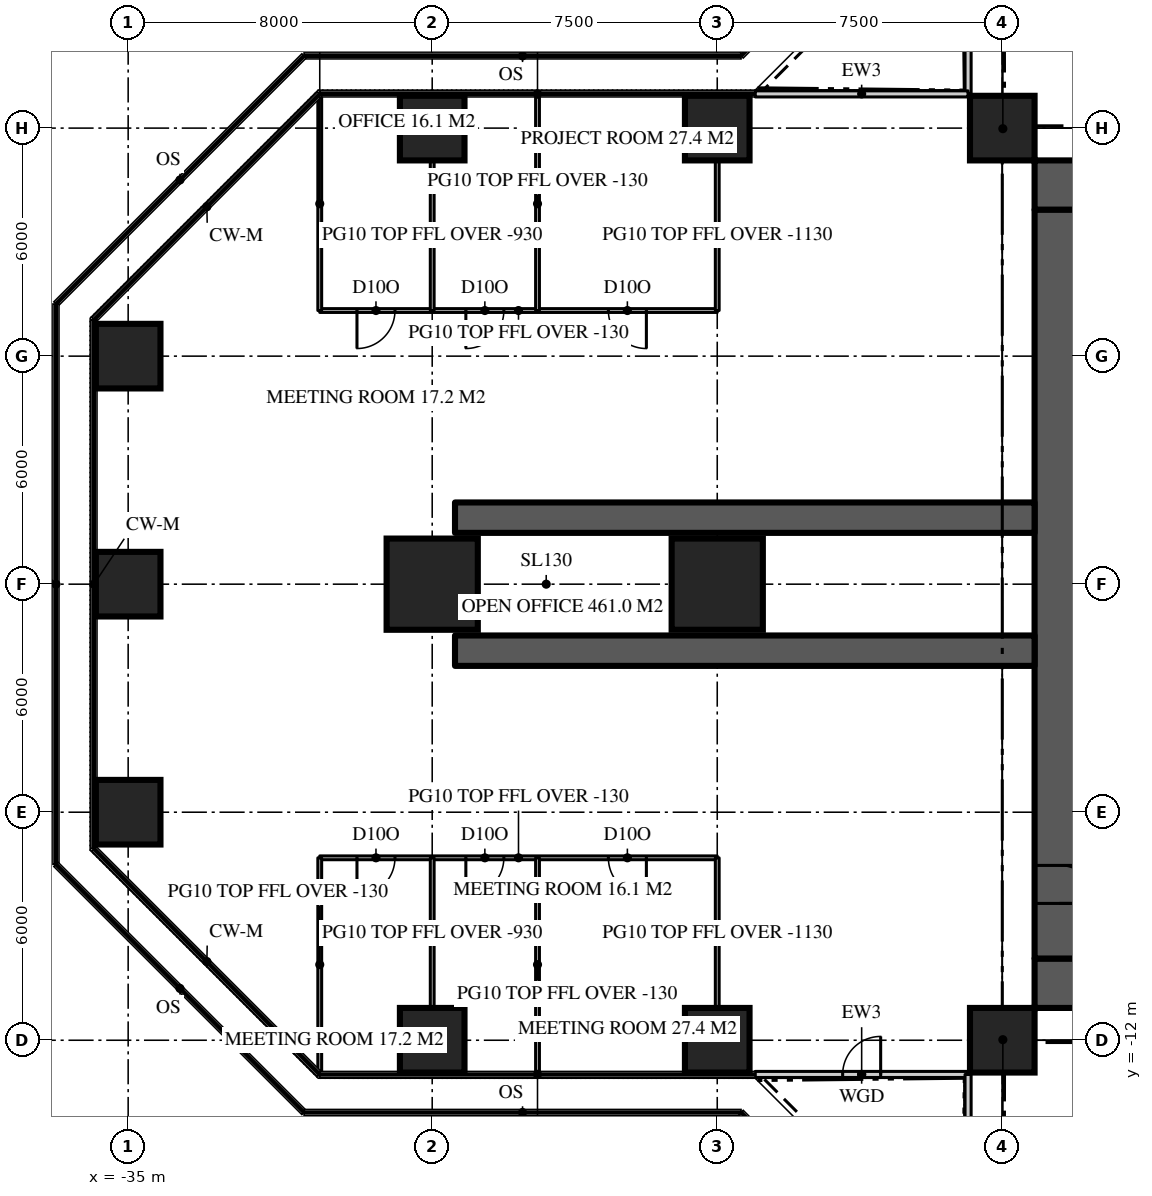
"""IFC4 building model, lengths in metres.
Left out: names, types, materials, properties, quantities, classifications, styles, units other than length and angle.
Written with IfcOpenShell. Run it as: python <this file> out.ifc"""

import sys

from ifc_helpers import new_model, si_unit, direction, frame, frame_2d, origin, origin_2d, place, context, subcontext, project, spatial, rectangle, extrude, element, fill, save


model = new_model("IFC4")
c1 = context("Model", 3, precision=1e-05, world=origin(), true_north=direction((0.0, 1.0)))
c2 = subcontext(c1, "Body", "Model", "MODEL_VIEW")
j1 = project(units=[si_unit("LENGTHUNIT", "METRE"), si_unit("PLANEANGLEUNIT", "RADIAN")], contexts=[c1])
p1 = place(None, origin())
s1 = spatial("IfcSite", under=j1, at=p1, CompositionType="ELEMENT")
p2 = place(p1, origin())
s2 = spatial("IfcBuilding", under=s1, at=p2, CompositionType="ELEMENT")
p3 = place(p2, frame((0.0, 0.0, 171.0)))
s3 = spatial("IfcBuildingStorey", under=s2, at=p3, CompositionType="ELEMENT", Elevation=171.0)
p4 = place(p3, frame((-11.15, 10.5, 0.0), z_axis=(0.0, 0.0, 1.0), x_axis=(1.0, 0.0, 0.0)))
e1 = element("IfcWall", 1, at=p4, inside=s3, PredefinedType="SHEAR", context=c2, shape_type="SweptSolid", body=[
    extrude(rectangle(XDim=22.3, YDim=1.3, at=frame_2d((11.15, 0.0))), origin(), (0.0, 0.0, 1.0), 3.9),
])
p5 = place(p4, frame((4.25, 0.0, 0.0)))
e2 = element("IfcOpeningElement", 2, at=p5, cuts=e1, PredefinedType="OPENING", context=c2, shape_type="SweptSolid", body=[
    extrude(rectangle(XDim=1.8, YDim=2.2, at=frame_2d((0.9, 1.1))), frame((0.0, 0.66, 0.0), z_axis=(0.0, -1.0, 0.0), x_axis=(1.0, 0.0, 0.0)), (0.0, 0.0, 1.0), 1.32),
])
p6 = place(p4, frame((16.25, 0.0, 0.0)))
e3 = element("IfcOpeningElement", 3, at=p6, cuts=e1, PredefinedType="OPENING", context=c2, shape_type="SweptSolid", body=[
    extrude(rectangle(XDim=1.8, YDim=2.2, at=frame_2d((0.9, 1.1))), frame((0.0, 0.66, 0.0), z_axis=(0.0, -1.0, 0.0), x_axis=(1.0, 0.0, 0.0)), (0.0, 0.0, 1.0), 1.32),
])
p7 = place(p3, frame((11.15, -10.5, 0.0), z_axis=(0.0, 0.0, 1.0), x_axis=(-1.0, 0.0, 0.0)))
e4 = element("IfcWall", 4, at=p7, inside=s3, PredefinedType="SHEAR", context=c2, shape_type="SweptSolid", body=[
    extrude(rectangle(XDim=22.3, YDim=1.3, at=frame_2d((11.15, 0.0))), origin(), (0.0, 0.0, 1.0), 3.9),
])
p8 = place(p7, frame((16.25, 0.0, 0.0)))
e5 = element("IfcOpeningElement", 5, at=p8, cuts=e4, PredefinedType="OPENING", context=c2, shape_type="SweptSolid", body=[
    extrude(rectangle(XDim=1.8, YDim=2.2, at=frame_2d((0.9, 1.1))), frame((0.0, 0.66, 0.0), z_axis=(0.0, -1.0, 0.0), x_axis=(1.0, 0.0, 0.0)), (0.0, 0.0, 1.0), 1.32),
])
p9 = place(p7, frame((4.25, 0.0, 0.0)))
e6 = element("IfcOpeningElement", 6, at=p9, cuts=e4, PredefinedType="OPENING", context=c2, shape_type="SweptSolid", body=[
    extrude(rectangle(XDim=1.8, YDim=2.2, at=frame_2d((0.9, 1.1))), frame((0.0, 0.66, 0.0), z_axis=(0.0, -1.0, 0.0), x_axis=(1.0, 0.0, 0.0)), (0.0, 0.0, 1.0), 1.32),
])
p10 = place(p3, frame((-10.5, 9.85, 0.0), z_axis=(0.0, 0.0, 1.0), x_axis=(0.0, -1.0, 0.0)))
e7 = element("IfcWall", 7, at=p10, inside=s3, PredefinedType="SHEAR", context=c2, shape_type="SweptSolid", body=[
    extrude(rectangle(XDim=19.7, YDim=1.3, at=frame_2d((9.85, 0.0))), origin(), (0.0, 0.0, 1.0), 3.9),
])
p11 = place(p10, frame((17.25, 0.0, 0.0)))
e8 = element("IfcOpeningElement", 8, at=p11, cuts=e7, PredefinedType="OPENING", context=c2, shape_type="SweptSolid", body=[
    extrude(rectangle(XDim=1.0, YDim=2.2, at=frame_2d((0.5, 1.1))), frame((0.0, 0.66, 0.0), z_axis=(0.0, -1.0, 0.0), x_axis=(1.0, 0.0, 0.0)), (0.0, 0.0, 1.0), 1.32),
])
for number, where, z_axis, x_axis in (
    (9, (-11.15, 1.75, 0.0), (0.0, 0.0, 1.0), (-1.0, 0.0, 0.0)),
    (10, (-11.15, -1.75, 0.0), (0.0, 0.0, 1.0), (-1.0, 0.0, 0.0)),
):
    element("IfcWall", number, at=place(p3, frame(where, z_axis=z_axis, x_axis=x_axis)), inside=s3, PredefinedType="SHEAR", context=c2, shape_type="SweptSolid", body=[
        extrude(rectangle(XDim=15.25, YDim=0.8, at=frame_2d((7.625, 0.0))), origin(), (0.0, 0.0, 1.0), 3.9),
    ])
for number, where, z_axis, x_axis in (
    (11, (-27.0, -12.0, 0.0), (0.0, 0.0, 1.0), (1.0, 0.0, 0.0)),
    (12, (-19.5, -12.0, 0.0), (0.0, 0.0, 1.0), (1.0, 0.0, 0.0)),
    (13, (-12.0, -12.0, 0.0), (0.0, 0.0, 1.0), (1.0, 0.0, 0.0)),
    (14, (-35.0, -6.0, 0.0), (0.0, 0.0, 1.0), (1.0, 0.0, 0.0)),
    (15, (-35.0, 0.0, 0.0), (0.0, 0.0, 1.0), (1.0, 0.0, 0.0)),
):
    element("IfcColumn", number, at=place(p3, frame(where, z_axis=z_axis, x_axis=x_axis)), inside=s3, PredefinedType="COLUMN", context=c2, shape_type="SweptSolid", body=[
        extrude(rectangle(XDim=1.7, YDim=1.7, at=origin_2d()), origin(), (0.0, 0.0, 1.0), 3.9),
    ])
for number, where, z_axis, x_axis in (
    (16, (-27.0, 0.0, 0.0), (0.0, 0.0, 1.0), (1.0, 0.0, 0.0)),
    (17, (-19.5, 0.0, 0.0), (0.0, 0.0, 1.0), (1.0, 0.0, 0.0)),
):
    element("IfcColumn", number, at=place(p3, frame(where, z_axis=z_axis, x_axis=x_axis)), inside=s3, PredefinedType="COLUMN", context=c2, shape_type="SweptSolid", body=[
        extrude(rectangle(XDim=2.4, YDim=2.4, at=origin_2d()), origin(), (0.0, 0.0, 1.0), 3.9),
    ])
for number, where, z_axis, x_axis in (
    (18, (-35.0, 6.0, 0.0), (0.0, 0.0, 1.0), (1.0, 0.0, 0.0)),
    (19, (-27.0, 12.0, 0.0), (0.0, 0.0, 1.0), (1.0, 0.0, 0.0)),
    (20, (-19.5, 12.0, 0.0), (0.0, 0.0, 1.0), (1.0, 0.0, 0.0)),
    (21, (-12.0, 12.0, 0.0), (0.0, 0.0, 1.0), (1.0, 0.0, 0.0)),
):
    element("IfcColumn", number, at=place(p3, frame(where, z_axis=z_axis, x_axis=x_axis)), inside=s3, PredefinedType="COLUMN", context=c2, shape_type="SweptSolid", body=[
        extrude(rectangle(XDim=1.7, YDim=1.7, at=origin_2d()), origin(), (0.0, 0.0, 1.0), 3.9),
    ])
p12 = place(p3, frame((-12.9, 18.5, 0.0), z_axis=(0.0, 0.0, 1.0), x_axis=(0.0, -1.0, 0.0)))
e22 = element("IfcWall", 22, at=p12, inside=s3, PredefinedType="SOLIDWALL", context=c2, shape_type="SweptSolid", body=[
    extrude(rectangle(XDim=5.6, YDim=0.16, at=frame_2d((2.8, 0.0))), origin(), (0.0, 0.0, 1.0), 3.77),
])
p13 = place(p12, frame((2.3, 0.0, 0.0)))
e23 = element("IfcOpeningElement", 23, at=p13, cuts=e22, PredefinedType="OPENING", context=c2, shape_type="SweptSolid", body=[
    extrude(rectangle(XDim=1.0, YDim=2.2, at=frame_2d((0.5, 1.1))), frame((0.0, 0.09, 0.0), z_axis=(0.0, -1.0, 0.0), x_axis=(1.0, 0.0, 0.0)), (0.0, 0.0, 1.0), 0.18),
])
p14 = place(p3, frame((-12.9, 12.9, 0.0), z_axis=(0.0, 0.0, 1.0), x_axis=(-1.0, 0.0, 0.0)))
e24 = element("IfcWall", 24, at=p14, inside=s3, PredefinedType="SOLIDWALL", context=c2, shape_type="SweptSolid", body=[
    extrude(rectangle(XDim=5.6, YDim=0.16, at=frame_2d((2.8, 0.0))), origin(), (0.0, 0.0, 1.0), 3.77),
])
p15 = place(p3, frame((-18.5, -12.9, 0.0), z_axis=(0.0, 0.0, 1.0), x_axis=(1.0, 0.0, 0.0)))
e25 = element("IfcWall", 25, at=p15, inside=s3, PredefinedType="SOLIDWALL", context=c2, shape_type="SweptSolid", body=[
    extrude(rectangle(XDim=5.6, YDim=0.16, at=frame_2d((2.8, 0.0))), origin(), (0.0, 0.0, 1.0), 3.77),
])
p16 = place(p15, frame((2.3, 0.0, 0.0)))
e26 = element("IfcOpeningElement", 26, at=p16, cuts=e25, PredefinedType="OPENING", context=c2, shape_type="SweptSolid", body=[
    extrude(rectangle(XDim=1.0, YDim=2.2, at=frame_2d((0.5, 1.1))), frame((0.0, 0.09, 0.0), z_axis=(0.0, -1.0, 0.0), x_axis=(1.0, 0.0, 0.0)), (0.0, 0.0, 1.0), 0.18),
])
p17 = place(p3, frame((-12.9, -12.9, 0.0), z_axis=(0.0, 0.0, 1.0), x_axis=(0.0, -1.0, 0.0)))
e27 = element("IfcWall", 27, at=p17, inside=s3, PredefinedType="SOLIDWALL", context=c2, shape_type="SweptSolid", body=[
    extrude(rectangle(XDim=5.6, YDim=0.16, at=frame_2d((2.8, 0.0))), origin(), (0.0, 0.0, 1.0), 3.77),
])
p18 = place(p3, frame((-19.5, -7.2, 0.0), z_axis=(0.0, 0.0, 1.0), x_axis=(-1.0, 0.0, 0.0)))
e28 = element("IfcWall", 28, at=p18, inside=s3, PredefinedType="PARTITIONING", context=c2, shape_type="SweptSolid", body=[
    extrude(rectangle(XDim=10.459, YDim=0.1, at=frame_2d((5.229, 0.0))), origin(), (0.0, 0.0, 1.0), 3.77),
])
p19 = place(p18, frame((1.865, 0.0, 0.0)))
e29 = element("IfcOpeningElement", 29, at=p19, cuts=e28, PredefinedType="OPENING", context=c2, shape_type="SweptSolid", body=[
    extrude(rectangle(XDim=1.0, YDim=2.2, at=frame_2d((0.5, 1.1))), frame((0.0, 0.06, 0.0), z_axis=(0.0, -1.0, 0.0), x_axis=(1.0, 0.0, 0.0)), (0.0, 0.0, 1.0), 0.12),
])
p20 = place(p18, frame((5.615, 0.0, 0.0)))
e30 = element("IfcOpeningElement", 30, at=p20, cuts=e28, PredefinedType="OPENING", context=c2, shape_type="SweptSolid", body=[
    extrude(rectangle(XDim=1.0, YDim=2.2, at=frame_2d((0.5, 1.1))), frame((0.0, 0.06, 0.0), z_axis=(0.0, -1.0, 0.0), x_axis=(1.0, 0.0, 0.0)), (0.0, 0.0, 1.0), 0.12),
])
p21 = place(p18, frame((8.479, 0.0, 0.0)))
e31 = element("IfcOpeningElement", 31, at=p21, cuts=e28, PredefinedType="OPENING", context=c2, shape_type="SweptSolid", body=[
    extrude(rectangle(XDim=1.0, YDim=2.2, at=frame_2d((0.5, 1.1))), frame((0.0, 0.06, 0.0), z_axis=(0.0, -1.0, 0.0), x_axis=(1.0, 0.0, 0.0)), (0.0, 0.0, 1.0), 0.12),
])
p22 = place(p3, frame((-19.5, -7.2, 0.0), z_axis=(0.0, 0.0, 1.0), x_axis=(0.0, -1.0, 0.0)))
e32 = element("IfcWall", 32, at=p22, inside=s3, PredefinedType="PARTITIONING", context=c2, shape_type="SweptSolid", body=[
    extrude(rectangle(XDim=3.95, YDim=0.1, at=frame_2d((1.975, 0.0))), origin(), (0.0, 0.0, 1.0), 2.77),
])
p23 = place(p3, frame((-24.229, -7.2, 0.0), z_axis=(0.0, 0.0, 1.0), x_axis=(0.0, -1.0, 0.0)))
e33 = element("IfcWall", 33, at=p23, inside=s3, PredefinedType="PARTITIONING", context=c2, shape_type="SweptSolid", body=[
    extrude(rectangle(XDim=5.62, YDim=0.1, at=frame_2d((2.81, 0.0))), origin(), (0.0, 0.0, 1.0), 3.77),
])
p24 = place(p3, frame((-27.0, -7.2, 0.0), z_axis=(0.0, 0.0, 1.0), x_axis=(0.0, -1.0, 0.0)))
e34 = element("IfcWall", 34, at=p24, inside=s3, PredefinedType="PARTITIONING", context=c2, shape_type="SweptSolid", body=[
    extrude(rectangle(XDim=3.95, YDim=0.1, at=frame_2d((1.975, 0.0))), origin(), (0.0, 0.0, 1.0), 2.97),
])
p25 = place(p3, frame((-29.959, -7.2, 0.0), z_axis=(0.0, 0.0, 1.0), x_axis=(0.0, -1.0, 0.0)))
e35 = element("IfcWall", 35, at=p25, inside=s3, PredefinedType="PARTITIONING", context=c2, shape_type="SweptSolid", body=[
    extrude(rectangle(XDim=5.62, YDim=0.1, at=frame_2d((2.81, 0.0))), origin(), (0.0, 0.0, 1.0), 3.77),
])
p26 = place(p3, frame((-19.5, 7.2, 0.0), z_axis=(0.0, 0.0, 1.0), x_axis=(-1.0, 0.0, 0.0)))
e36 = element("IfcWall", 36, at=p26, inside=s3, PredefinedType="PARTITIONING", context=c2, shape_type="SweptSolid", body=[
    extrude(rectangle(XDim=10.459, YDim=0.1, at=frame_2d((5.229, 0.0))), origin(), (0.0, 0.0, 1.0), 3.77),
])
p27 = place(p26, frame((1.865, 0.0, 0.0)))
e37 = element("IfcOpeningElement", 37, at=p27, cuts=e36, PredefinedType="OPENING", context=c2, shape_type="SweptSolid", body=[
    extrude(rectangle(XDim=1.0, YDim=2.2, at=frame_2d((0.5, 1.1))), frame((0.0, 0.06, 0.0), z_axis=(0.0, -1.0, 0.0), x_axis=(1.0, 0.0, 0.0)), (0.0, 0.0, 1.0), 0.12),
])
p28 = place(p26, frame((5.615, 0.0, 0.0)))
e38 = element("IfcOpeningElement", 38, at=p28, cuts=e36, PredefinedType="OPENING", context=c2, shape_type="SweptSolid", body=[
    extrude(rectangle(XDim=1.0, YDim=2.2, at=frame_2d((0.5, 1.1))), frame((0.0, 0.06, 0.0), z_axis=(0.0, -1.0, 0.0), x_axis=(1.0, 0.0, 0.0)), (0.0, 0.0, 1.0), 0.12),
])
p29 = place(p26, frame((8.479, 0.0, 0.0)))
e39 = element("IfcOpeningElement", 39, at=p29, cuts=e36, PredefinedType="OPENING", context=c2, shape_type="SweptSolid", body=[
    extrude(rectangle(XDim=1.0, YDim=2.2, at=frame_2d((0.5, 1.1))), frame((0.0, 0.06, 0.0), z_axis=(0.0, -1.0, 0.0), x_axis=(1.0, 0.0, 0.0)), (0.0, 0.0, 1.0), 0.12),
])
p30 = place(p3, frame((-19.5, 7.2, 0.0), z_axis=(0.0, 0.0, 1.0), x_axis=(0.0, 1.0, 0.0)))
e40 = element("IfcWall", 40, at=p30, inside=s3, PredefinedType="PARTITIONING", context=c2, shape_type="SweptSolid", body=[
    extrude(rectangle(XDim=3.95, YDim=0.1, at=frame_2d((1.975, 0.0))), origin(), (0.0, 0.0, 1.0), 2.77),
])
p31 = place(p3, frame((-24.229, 7.2, 0.0), z_axis=(0.0, 0.0, 1.0), x_axis=(0.0, 1.0, 0.0)))
e41 = element("IfcWall", 41, at=p31, inside=s3, PredefinedType="PARTITIONING", context=c2, shape_type="SweptSolid", body=[
    extrude(rectangle(XDim=5.62, YDim=0.1, at=frame_2d((2.81, 0.0))), origin(), (0.0, 0.0, 1.0), 3.77),
])
p32 = place(p3, frame((-27.0, 7.2, 0.0), z_axis=(0.0, 0.0, 1.0), x_axis=(0.0, 1.0, 0.0)))
e42 = element("IfcWall", 42, at=p32, inside=s3, PredefinedType="PARTITIONING", context=c2, shape_type="SweptSolid", body=[
    extrude(rectangle(XDim=3.95, YDim=0.1, at=frame_2d((1.975, 0.0))), origin(), (0.0, 0.0, 1.0), 2.97),
])
p33 = place(p3, frame((-29.959, 7.2, 0.0), z_axis=(0.0, 0.0, 1.0), x_axis=(0.0, 1.0, 0.0)))
e43 = element("IfcWall", 43, at=p33, inside=s3, PredefinedType="PARTITIONING", context=c2, shape_type="SweptSolid", body=[
    extrude(rectangle(XDim=5.62, YDim=0.1, at=frame_2d((2.81, 0.0))), origin(), (0.0, 0.0, 1.0), 3.77),
])
for number, where, z_axis, x_axis in (
    (44, (-11.15, 11.15, 0.0), (0.0, 0.0, 1.0), (-0.707, 0.707, 0.0)),
    (45, (-11.15, -11.15, 0.0), (0.0, 0.0, 1.0), (-0.707, -0.707, 0.0)),
):
    element("IfcWall", number, at=place(p3, frame(where, z_axis=z_axis, x_axis=x_axis)), inside=s3, PredefinedType="PARTITIONING", context=c2, shape_type="SweptSolid", body=[
        extrude(rectangle(XDim=2.362, YDim=0.15, at=frame_2d((1.181, 0.0))), origin(), (0.0, 0.0, 1.0), 3.22),
    ])
p34 = place(p16, origin())
e46 = element("IfcDoor", 46, at=p34, inside=s3, OperationType="SINGLE_SWING_RIGHT", PredefinedType="DOOR", context=c2, shape_type="SweptSolid", body=[
    extrude(rectangle(XDim=1.0, YDim=2.2, at=frame_2d((0.5, 1.1))), frame((0.0, 0.025, 0.0), z_axis=(0.0, -1.0, 0.0), x_axis=(1.0, 0.0, 0.0)), (0.0, 0.0, 1.0), 0.05),
])
fill(e26, e46)
p35 = place(p11, origin())
e47 = element("IfcDoor", 47, at=p35, inside=s3, OperationType="SINGLE_SWING_RIGHT", PredefinedType="DOOR", context=c2, shape_type="SweptSolid", body=[
    extrude(rectangle(XDim=1.0, YDim=2.2, at=frame_2d((0.5, 1.1))), frame((0.0, 0.025, 0.0), z_axis=(0.0, -1.0, 0.0), x_axis=(1.0, 0.0, 0.0)), (0.0, 0.0, 1.0), 0.05),
])
fill(e8, e47)
p36 = place(p19, origin())
e48 = element("IfcDoor", 48, at=p36, inside=s3, OperationType="SINGLE_SWING_LEFT", PredefinedType="DOOR", context=c2, shape_type="SweptSolid", body=[
    extrude(rectangle(XDim=1.0, YDim=2.2, at=frame_2d((0.5, 1.1))), frame((0.0, 0.025, 0.0), z_axis=(0.0, -1.0, 0.0), x_axis=(1.0, 0.0, 0.0)), (0.0, 0.0, 1.0), 0.05),
])
fill(e29, e48)
p37 = place(p20, origin())
e49 = element("IfcDoor", 49, at=p37, inside=s3, OperationType="SINGLE_SWING_RIGHT", PredefinedType="DOOR", context=c2, shape_type="SweptSolid", body=[
    extrude(rectangle(XDim=1.0, YDim=2.2, at=frame_2d((0.5, 1.1))), frame((0.0, 0.025, 0.0), z_axis=(0.0, -1.0, 0.0), x_axis=(1.0, 0.0, 0.0)), (0.0, 0.0, 1.0), 0.05),
])
fill(e30, e49)
p38 = place(p21, origin())
e50 = element("IfcDoor", 50, at=p38, inside=s3, OperationType="SINGLE_SWING_RIGHT", PredefinedType="DOOR", context=c2, shape_type="SweptSolid", body=[
    extrude(rectangle(XDim=1.0, YDim=2.2, at=frame_2d((0.5, 1.1))), frame((0.0, 0.025, 0.0), z_axis=(0.0, -1.0, 0.0), x_axis=(1.0, 0.0, 0.0)), (0.0, 0.0, 1.0), 0.05),
])
fill(e31, e50)
p39 = place(p27, origin())
e51 = element("IfcDoor", 51, at=p39, inside=s3, OperationType="SINGLE_SWING_LEFT", PredefinedType="DOOR", context=c2, shape_type="SweptSolid", body=[
    extrude(rectangle(XDim=1.0, YDim=2.2, at=frame_2d((0.5, 1.1))), frame((0.0, 0.025, 0.0), z_axis=(0.0, -1.0, 0.0), x_axis=(1.0, 0.0, 0.0)), (0.0, 0.0, 1.0), 0.05),
])
fill(e37, e51)
p40 = place(p28, origin())
e52 = element("IfcDoor", 52, at=p40, inside=s3, OperationType="SINGLE_SWING_RIGHT", PredefinedType="DOOR", context=c2, shape_type="SweptSolid", body=[
    extrude(rectangle(XDim=1.0, YDim=2.2, at=frame_2d((0.5, 1.1))), frame((0.0, 0.025, 0.0), z_axis=(0.0, -1.0, 0.0), x_axis=(1.0, 0.0, 0.0)), (0.0, 0.0, 1.0), 0.05),
])
fill(e38, e52)
p41 = place(p29, origin())
e53 = element("IfcDoor", 53, at=p41, inside=s3, OperationType="SINGLE_SWING_RIGHT", PredefinedType="DOOR", context=c2, shape_type="SweptSolid", body=[
    extrude(rectangle(XDim=1.0, YDim=2.2, at=frame_2d((0.5, 1.1))), frame((0.0, 0.025, 0.0), z_axis=(0.0, -1.0, 0.0), x_axis=(1.0, 0.0, 0.0)), (0.0, 0.0, 1.0), 0.05),
])
fill(e39, e53)
save(model, sys.argv[1])
